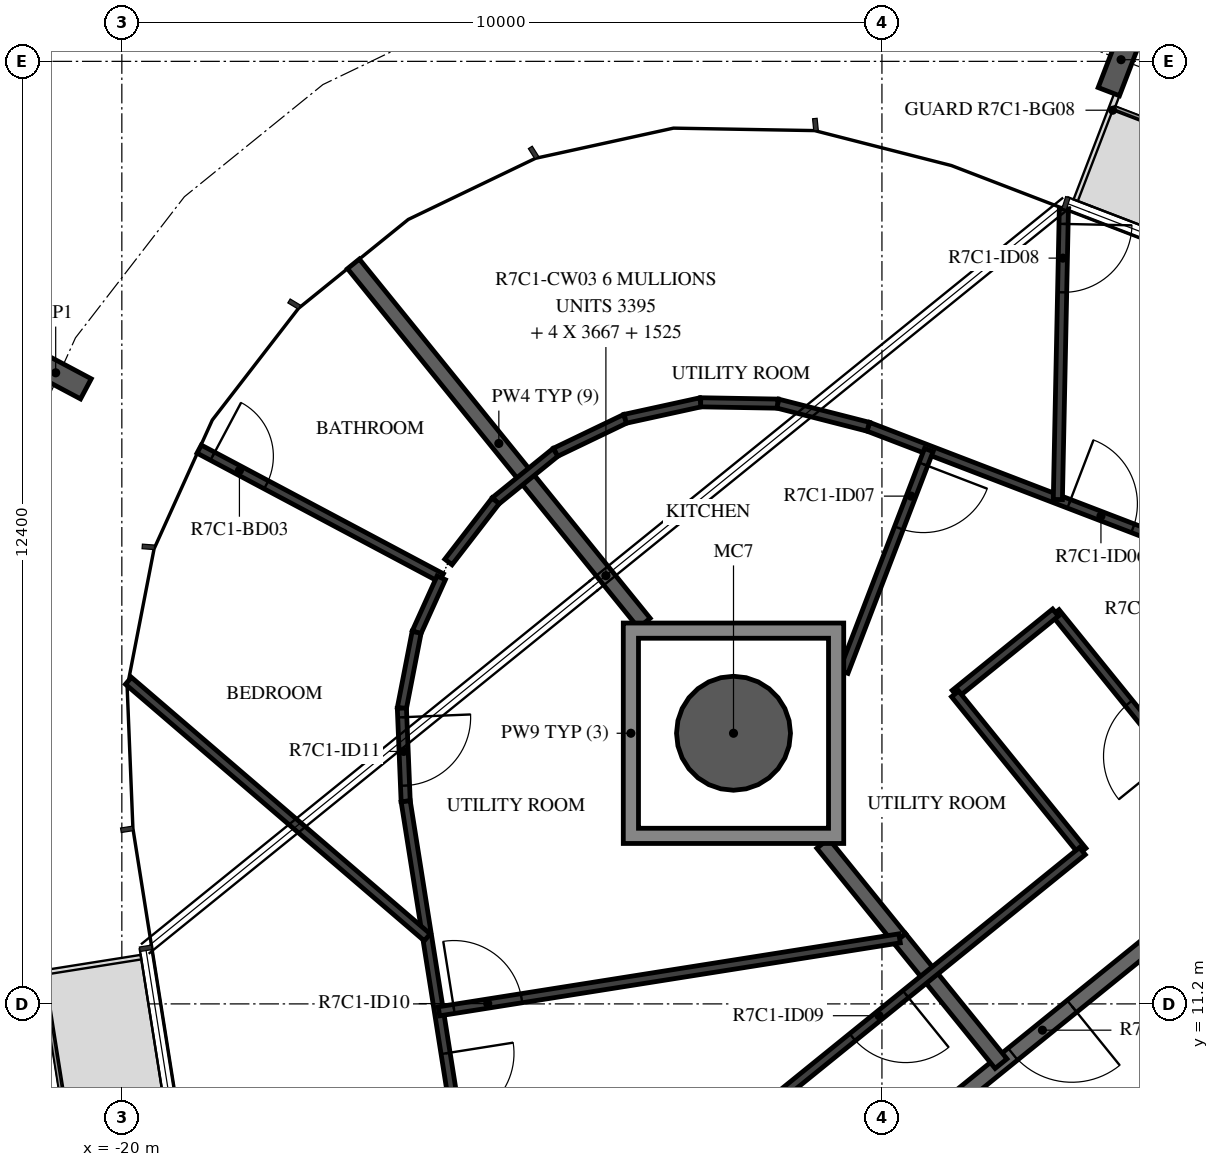
"""IFC4 building model, lengths in metres.
Left out: names, types, materials, properties, quantities, classifications, styles, units other than length and angle.
Written with IfcOpenShell. Run it as: python <this file> out.ifc"""

import sys

from ifc_helpers import new_model, si_unit, direction, frame, frame_2d, origin, origin_2d, place, context, subcontext, project, spatial, polyline, rectangle, hollow_circle, i_section, outline, extrude, element, fill, save


model = new_model("IFC4")
c1 = context("Model", 3, precision=1e-05, world=origin(), true_north=direction((0.0, 1.0)))
c2 = subcontext(c1, "Body", "Model", "MODEL_VIEW")
j1 = project(units=[si_unit("LENGTHUNIT", "METRE"), si_unit("PLANEANGLEUNIT", "RADIAN")], contexts=[c1])
p1 = place(None, origin())
s1 = spatial("IfcSite", under=j1, at=p1, CompositionType="ELEMENT")
p2 = place(p1, origin())
s2 = spatial("IfcBuilding", under=s1, at=p2, CompositionType="ELEMENT")
p3 = place(p2, frame((0.0, 0.0, 287.9)))
s3 = spatial("IfcBuildingStorey", under=s2, at=p3, CompositionType="ELEMENT", Elevation=287.9)
p4 = place(p3, frame((-11.953, 14.76, -0.38), z_axis=(0.0, 0.0, 1.0), x_axis=(1.0, 0.0, 0.0)))
e1 = element("IfcColumn", 1, at=p4, inside=s3, PredefinedType="COLUMN", context=c2, shape_type="SweptSolid", body=[
    extrude(hollow_circle(Radius=0.75, WallThickness=0.035, at=origin_2d()), origin(), (0.0, 0.0, 1.0), 2.616),
])
for number, where, z_axis, x_axis in (
    (2, (-6.854, 23.622, -0.38), (0.0, 0.0, 1.0), (0.934, -0.358, 0.0)),
    (3, (-20.87, 19.503, -0.38), (0.0, 0.0, 1.0), (0.47, 0.883, 0.0)),
):
    element("IfcColumn", number, at=place(p3, frame(where, z_axis=z_axis, x_axis=x_axis)), inside=s3, PredefinedType="COLUMN", context=c2, shape_type="SweptSolid", body=[
        extrude(i_section(OverallWidth=0.3, OverallDepth=0.9, WebThickness=0.019, FlangeThickness=0.035, FilletRadius=0.03, at=origin_2d()), origin(), (0.0, 0.0, 1.0), 2.616),
    ])
p5 = place(p3, frame((-4.51, 10.845, 0.0), z_axis=(0.0, 0.0, 1.0), x_axis=(-0.865975092491, -0.500087131594, 0.0)))
e4 = element("IfcWall", 4, at=p5, inside=s3, PredefinedType="SHEAR", context=c2, shape_type="SweptSolid", body=[
    extrude(rectangle(XDim=3.033, YDim=0.5, at=frame_2d((1.516, 0.0))), origin(), (0.0, 0.0, 1.0), 3.05),
])
p6 = place(p3, frame((-5.643, 12.673, 0.0), z_axis=(0.0, 0.0, 1.0), x_axis=(-0.777160148113, -0.629302871585, 0.0)))
e5 = element("IfcWall", 5, at=p6, inside=s3, PredefinedType="STANDARD", context=c2, shape_type="SweptSolid", body=[
    extrude(rectangle(XDim=7.181, YDim=0.2, at=frame_2d((3.59, 0.0))), origin(), (0.0, 0.0, 1.0), 3.05),
])
p7 = place(p6, frame((2.39, 0.0, 0.0)))
e6 = element("IfcOpeningElement", 6, at=p7, cuts=e5, PredefinedType="OPENING", context=c2, shape_type="SweptSolid", body=[
    extrude(rectangle(XDim=1.0, YDim=2.1, at=frame_2d((0.5, 1.05))), frame((0.0, 0.11, 0.0), z_axis=(0.0, -1.0, 0.0), x_axis=(1.0, 0.0, 0.0)), (0.0, 0.0, 1.0), 0.22),
])
p8 = place(p6, frame((5.19, 0.0, 0.0)))
e7 = element("IfcOpeningElement", 7, at=p8, cuts=e5, PredefinedType="OPENING", context=c2, shape_type="SweptSolid", body=[
    extrude(rectangle(XDim=1.0, YDim=2.1, at=frame_2d((0.5, 1.05))), frame((0.0, 0.11, 0.0), z_axis=(0.0, -1.0, 0.0), x_axis=(1.0, 0.0, 0.0)), (0.0, 0.0, 1.0), 0.22),
])
p9 = place(p3, frame((-9.768, 12.062, 0.0), z_axis=(0.0, 0.0, 1.0), x_axis=(0.629274383598, -0.777183215302, 0.0)))
e8 = element("IfcWall", 8, at=p9, inside=s3, PredefinedType="STANDARD", context=c2, shape_type="SweptSolid", body=[
    extrude(rectangle(XDim=2.121, YDim=0.2, at=frame_2d((1.061, 0.0))), origin(), (0.0, 0.0, 1.0), 3.05),
])
p10 = place(p3, frame((-10.779, 13.311, 0.0), z_axis=(0.0, 0.0, 1.0), x_axis=(0.629373100483, -0.77710327524, 0.0)))
e9 = element("IfcWall", 9, at=p10, inside=s3, PredefinedType="STANDARD", context=c2, shape_type="SweptSolid", body=[
    extrude(rectangle(XDim=1.606, YDim=0.2, at=frame_2d((0.803, 0.0))), origin(), (0.0, 0.0, 1.0), 3.05),
])
p11 = place(p3, frame((-16.953, 20.936, 0.0), z_axis=(0.0, 0.0, 1.0), x_axis=(0.629331057166, -0.777137324085, 0.0)))
e10 = element("IfcWall", 10, at=p11, inside=s3, PredefinedType="STANDARD", context=c2, shape_type="SweptSolid", body=[
    extrude(rectangle(XDim=6.08, YDim=0.2, at=frame_2d((3.04, 0.0))), origin(), (0.0, 0.0, 1.0), 3.05),
])
p12 = place(p3, frame((-5.933, 14.146, 0.0), z_axis=(0.0, 0.0, 1.0), x_axis=(-0.62930727886, 0.777156579316, 0.0)))
e11 = element("IfcWall", 11, at=p12, inside=s3, PredefinedType="PARTITIONING", context=c2, shape_type="SweptSolid", body=[
    extrude(rectangle(XDim=2.833, YDim=0.12, at=frame_2d((1.417, 0.0))), origin(), (0.0, 0.0, 1.0), 3.05),
])
p13 = place(p12, frame((0.4, 0.0, 0.0)))
e12 = element("IfcOpeningElement", 12, at=p13, cuts=e11, PredefinedType="OPENING", context=c2, shape_type="SweptSolid", body=[
    extrude(rectangle(XDim=0.9, YDim=2.1, at=frame_2d((0.45, 1.05))), frame((0.0, 0.07, 0.0), z_axis=(0.0, -1.0, 0.0), x_axis=(1.0, 0.0, 0.0)), (0.0, 0.0, 1.0), 0.14),
])
p14 = place(p3, frame((-7.717, 16.348, 0.0), z_axis=(0.0, 0.0, 1.0), x_axis=(-0.777184671515, -0.629272585103, 0.0)))
e13 = element("IfcWall", 13, at=p14, inside=s3, PredefinedType="PARTITIONING", context=c2, shape_type="SweptSolid", body=[
    extrude(rectangle(XDim=1.7, YDim=0.12, at=frame_2d((0.85, 0.0))), origin(), (0.0, 0.0, 1.0), 3.05),
])
p15 = place(p3, frame((-9.038, 15.278, 0.0), z_axis=(0.0, 0.0, 1.0), x_axis=(0.629338090938, -0.777131628037, 0.0)))
e14 = element("IfcWall", 14, at=p15, inside=s3, PredefinedType="PARTITIONING", context=c2, shape_type="SweptSolid", body=[
    extrude(rectangle(XDim=2.661, YDim=0.12, at=frame_2d((1.331, 0.0))), origin(), (0.0, 0.0, 1.0), 3.05),
])
p16 = place(p3, frame((-7.363, 13.21, 0.0), z_axis=(0.0, 0.0, 1.0), x_axis=(-0.777139504663, -0.629328364443, 0.0)))
e15 = element("IfcWall", 15, at=p16, inside=s3, PredefinedType="PARTITIONING", context=c2, shape_type="SweptSolid", body=[
    extrude(rectangle(XDim=6.584, YDim=0.12, at=frame_2d((3.292, 0.0))), origin(), (0.0, 0.0, 1.0), 3.05),
])
p17 = place(p16, frame((2.991, 0.0, 0.0)))
e16 = element("IfcOpeningElement", 16, at=p17, cuts=e15, PredefinedType="OPENING", context=c2, shape_type="SweptSolid", body=[
    extrude(rectangle(XDim=0.9, YDim=2.1, at=frame_2d((0.45, 1.05))), frame((0.0, 0.07, 0.0), z_axis=(0.0, -1.0, 0.0), x_axis=(1.0, 0.0, 0.0)), (0.0, 0.0, 1.0), 0.14),
])
p18 = place(p3, frame((-10.18, 18.793, 0.0), z_axis=(0.0, 0.0, 1.0), x_axis=(0.933574148929, -0.358384302742, 0.0)))
e17 = element("IfcWall", 17, at=p18, inside=s3, PredefinedType="PARTITIONING", context=c2, shape_type="SweptSolid", body=[
    extrude(rectangle(XDim=10.509, YDim=0.12, at=frame_2d((5.254, 0.0))), origin(), (0.0, 0.0, 1.0), 3.05),
])
p19 = place(p18, frame((2.829, 0.0, 0.0)))
e18 = element("IfcOpeningElement", 18, at=p19, cuts=e17, PredefinedType="OPENING", context=c2, shape_type="SweptSolid", body=[
    extrude(rectangle(XDim=0.9, YDim=2.1, at=frame_2d((0.45, 1.05))), frame((0.0, 0.07, 0.0), z_axis=(0.0, -1.0, 0.0), x_axis=(1.0, 0.0, 0.0)), (0.0, 0.0, 1.0), 0.14),
])
p20 = place(p3, frame((-7.606, 21.661, 0.0), z_axis=(0.0, 0.0, 1.0), x_axis=(-0.020735808663, -0.999784990005, 0.0)))
e19 = element("IfcWall", 19, at=p20, inside=s3, PredefinedType="PARTITIONING", context=c2, shape_type="SweptSolid", body=[
    extrude(rectangle(XDim=3.826, YDim=0.12, at=frame_2d((1.913, 0.0))), origin(), (0.0, 0.0, 1.0), 3.05),
])
p21 = place(p20, frame((0.2, 0.0, 0.0)))
e20 = element("IfcOpeningElement", 20, at=p21, cuts=e19, PredefinedType="OPENING", context=c2, shape_type="SweptSolid", body=[
    extrude(rectangle(XDim=0.9, YDim=2.1, at=frame_2d((0.45, 1.05))), frame((0.0, 0.07, 0.0), z_axis=(0.0, -1.0, 0.0), x_axis=(1.0, 0.0, 0.0)), (0.0, 0.0, 1.0), 0.14),
])
p22 = place(p3, frame((-9.383, 18.487, 0.0), z_axis=(0.0, 0.0, 1.0), x_axis=(-0.358340198137, -0.933591078792, 0.0)))
e21 = element("IfcWall", 21, at=p22, inside=s3, PredefinedType="PARTITIONING", context=c2, shape_type="SweptSolid", body=[
    extrude(rectangle(XDim=3.125, YDim=0.12, at=frame_2d((1.562, 0.0))), origin(), (0.0, 0.0, 1.0), 3.05),
])
p23 = place(p22, frame((0.2, 0.0, 0.0)))
e22 = element("IfcOpeningElement", 22, at=p23, cuts=e21, PredefinedType="OPENING", context=c2, shape_type="SweptSolid", body=[
    extrude(rectangle(XDim=0.9, YDim=2.1, at=frame_2d((0.45, 1.05))), frame((0.0, 0.07, 0.0), z_axis=(0.0, -1.0, 0.0), x_axis=(1.0, 0.0, 0.0)), (0.0, 0.0, 1.0), 0.14),
])
for number, where, z_axis, x_axis in (
    (23, (-15.083, 17.818, 0.0), (0.0, 0.0, 1.0), (0.777, 0.629, 0.0)),
    (24, (-14.293, 18.458, 0.0), (0.0, 0.0, 1.0), (0.901, 0.433, 0.0)),
):
    element("IfcWall", number, at=place(p3, frame(where, z_axis=z_axis, x_axis=x_axis)), inside=s3, PredefinedType="PARTITIONING", context=c2, shape_type="SweptSolid", body=[
        extrude(rectangle(XDim=1.016, YDim=0.12, at=frame_2d((0.508, 0.0))), origin(), (0.0, 0.0, 1.0), 3.05),
    ])
p24 = place(p3, frame((-13.377, 18.898, 0.0), z_axis=(0.0, 0.0, 1.0), x_axis=(0.976972067705, 0.213367239577, 0.0)))
e25 = element("IfcWall", 25, at=p24, inside=s3, PredefinedType="PARTITIONING", context=c2, shape_type="SweptSolid", body=[
    extrude(rectangle(XDim=1.016, YDim=0.12, at=frame_2d((0.508, 0.0))), origin(), (0.0, 0.0, 1.0), 3.05),
])
p25 = place(p3, frame((-12.385, 19.115, 0.0), z_axis=(0.0, 0.0, 1.0), x_axis=(0.999850255535, -0.017305100577, 0.0)))
e26 = element("IfcWall", 26, at=p25, inside=s3, PredefinedType="PARTITIONING", context=c2, shape_type="SweptSolid", body=[
    extrude(rectangle(XDim=1.016, YDim=0.12, at=frame_2d((0.508, 0.0))), origin(), (0.0, 0.0, 1.0), 3.05),
])
p26 = place(p3, frame((-11.369, 19.097, 0.0), z_axis=(0.0, 0.0, 1.0), x_axis=(0.968877104853, -0.247542230117, 0.0)))
e27 = element("IfcWall", 27, at=p26, inside=s3, PredefinedType="PARTITIONING", context=c2, shape_type="SweptSolid", body=[
    extrude(rectangle(XDim=1.227, YDim=0.12, at=frame_2d((0.613, 0.0))), origin(), (0.0, 0.0, 1.0), 3.05),
])
p27 = place(p3, frame((-15.703, 17.014, 0.0), z_axis=(0.0, 0.0, 1.0), x_axis=(0.611091802574, 0.791559731686, 0.0)))
e28 = element("IfcWall", 28, at=p27, inside=s3, PredefinedType="PARTITIONING", context=c2, shape_type="SweptSolid", body=[
    extrude(rectangle(XDim=1.016, YDim=0.12, at=frame_2d((0.508, 0.0))), origin(), (0.0, 0.0, 1.0), 3.05),
])
p28 = place(p3, frame((-18.983, 18.499, 0.0), z_axis=(0.0, 0.0, 1.0), x_axis=(0.882938650306, -0.469488380896, 0.0)))
e29 = element("IfcWall", 29, at=p28, inside=s3, PredefinedType="PARTITIONING", context=c2, shape_type="SweptSolid", body=[
    extrude(rectangle(XDim=3.607, YDim=0.12, at=frame_2d((1.804, 0.0))), origin(), (0.0, 0.0, 1.0), 3.05),
])
p29 = place(p28, frame((0.2, 0.0, 0.0)))
e30 = element("IfcOpeningElement", 30, at=p29, cuts=e29, PredefinedType="OPENING", context=c2, shape_type="SweptSolid", body=[
    extrude(rectangle(XDim=0.8, YDim=2.1, at=frame_2d((0.4, 1.05))), frame((0.0, 0.07, 0.0), z_axis=(0.0, -1.0, 0.0), x_axis=(1.0, 0.0, 0.0)), (0.0, 0.0, 1.0), 0.14),
])
p30 = place(p3, frame((-15.798, 16.805, 0.0), z_axis=(0.0, 0.0, 1.0), x_axis=(-0.411861127809, -0.911246624904, 0.0)))
e31 = element("IfcWall", 31, at=p30, inside=s3, PredefinedType="PARTITIONING", context=c2, shape_type="SweptSolid", body=[
    extrude(rectangle(XDim=0.787, YDim=0.12, at=frame_2d((0.393, 0.0))), origin(), (0.0, 0.0, 1.0), 3.05),
])
p31 = place(p3, frame((-16.122, 16.088, 0.0), z_axis=(0.0, 0.0, 1.0), x_axis=(-0.191030445301, -0.981584112019, 0.0)))
e32 = element("IfcWall", 32, at=p31, inside=s3, PredefinedType="PARTITIONING", context=c2, shape_type="SweptSolid", body=[
    extrude(rectangle(XDim=1.016, YDim=0.12, at=frame_2d((0.508, 0.0))), origin(), (0.0, 0.0, 1.0), 3.05),
])
p32 = place(p3, frame((-16.316, 15.091, 0.0), z_axis=(0.0, 0.0, 1.0), x_axis=(0.040786423131, -0.999167887639, 0.0)))
e33 = element("IfcWall", 33, at=p32, inside=s3, PredefinedType="PARTITIONING", context=c2, shape_type="SweptSolid", body=[
    extrude(rectangle(XDim=1.227, YDim=0.12, at=frame_2d((0.614, 0.0))), origin(), (0.0, 0.0, 1.0), 3.05),
])
p33 = place(p32, frame((0.12, 0.0, 0.0)))
e34 = element("IfcOpeningElement", 34, at=p33, cuts=e33, PredefinedType="OPENING", context=c2, shape_type="SweptSolid", body=[
    extrude(rectangle(XDim=0.9, YDim=2.1, at=frame_2d((0.45, 1.05))), frame((0.0, 0.07, 0.0), z_axis=(0.0, -1.0, 0.0), x_axis=(1.0, 0.0, 0.0)), (0.0, 0.0, 1.0), 0.14),
])
p34 = place(p3, frame((-16.266, 13.865, 0.0), z_axis=(0.0, 0.0, 1.0), x_axis=(0.156422690833, -0.987690205374, 0.0)))
e35 = element("IfcWall", 35, at=p34, inside=s3, PredefinedType="PARTITIONING", context=c2, shape_type="SweptSolid", body=[
    extrude(rectangle(XDim=9.482, YDim=0.12, at=frame_2d((4.741, 0.0))), origin(), (0.0, 0.0, 1.0), 3.05),
])
p35 = place(p34, frame((3.357, 0.0, 0.0)))
e36 = element("IfcOpeningElement", 36, at=p35, cuts=e35, PredefinedType="OPENING", context=c2, shape_type="SweptSolid", body=[
    extrude(rectangle(XDim=0.9, YDim=2.1, at=frame_2d((0.45, 1.05))), frame((0.0, 0.07, 0.0), z_axis=(0.0, -1.0, 0.0), x_axis=(1.0, 0.0, 0.0)), (0.0, 0.0, 1.0), 0.14),
])
p36 = place(p3, frame((-15.828, 11.102, 0.0), z_axis=(0.0, 0.0, 1.0), x_axis=(0.98768671358, 0.156444737262, 0.0)))
e37 = element("IfcWall", 37, at=p36, inside=s3, PredefinedType="PARTITIONING", context=c2, shape_type="SweptSolid", body=[
    extrude(rectangle(XDim=6.136, YDim=0.12, at=frame_2d((3.068, 0.0))), origin(), (0.0, 0.0, 1.0), 3.05),
])
p37 = place(p36, frame((0.2, 0.0, 0.0)))
e38 = element("IfcOpeningElement", 38, at=p37, cuts=e37, PredefinedType="OPENING", context=c2, shape_type="SweptSolid", body=[
    extrude(rectangle(XDim=0.9, YDim=2.1, at=frame_2d((0.45, 1.05))), frame((0.0, 0.07, 0.0), z_axis=(0.0, -1.0, 0.0), x_axis=(1.0, 0.0, 0.0)), (0.0, 0.0, 1.0), 0.14),
])
p38 = place(p3, frame((-19.913, 15.451, 0.0), z_axis=(0.0, 0.0, 1.0), x_axis=(0.758627615547, -0.651524474544, 0.0)))
e39 = element("IfcWall", 39, at=p38, inside=s3, PredefinedType="PARTITIONING", context=c2, shape_type="SweptSolid", body=[
    extrude(rectangle(XDim=5.181, YDim=0.12, at=frame_2d((2.591, 0.0))), origin(), (0.0, 0.0, 1.0), 3.05),
])
p39 = place(p3, origin())
e40 = element("IfcWall", 40, at=p39, inside=s3, PredefinedType="STANDARD", context=c2, shape_type="SweptSolid", body=[
    extrude(outline(polyline([(-10.503, 16.21), (-10.503, 13.311), (-13.403, 13.311), (-13.403, 16.21), (-10.503, 16.21)]), holes=[polyline([(-13.203, 13.51), (-10.703, 13.51), (-10.703, 16.01), (-13.203, 16.01), (-13.203, 13.51)])]), origin(), (0.0, 0.0, 1.0), 3.05),
])
p40 = place(p7, origin())
e41 = element("IfcDoor", 41, at=p40, inside=s3, OperationType="SINGLE_SWING_RIGHT", PredefinedType="DOOR", context=c2, shape_type="SweptSolid", body=[
    extrude(rectangle(XDim=1.0, YDim=2.1, at=frame_2d((0.5, 1.05))), frame((0.0, 0.025, 0.0), z_axis=(0.0, -1.0, 0.0), x_axis=(1.0, 0.0, 0.0)), (0.0, 0.0, 1.0), 0.05),
])
fill(e6, e41)
p41 = place(p13, origin())
e42 = element("IfcDoor", 42, at=p41, inside=s3, OperationType="SINGLE_SWING_RIGHT", PredefinedType="DOOR", context=c2, shape_type="SweptSolid", body=[
    extrude(rectangle(XDim=0.9, YDim=2.1, at=frame_2d((0.45, 1.05))), frame((0.0, 0.025, 0.0), z_axis=(0.0, -1.0, 0.0), x_axis=(1.0, 0.0, 0.0)), (0.0, 0.0, 1.0), 0.05),
])
fill(e12, e42)
p42 = place(p19, origin())
e43 = element("IfcDoor", 43, at=p42, inside=s3, OperationType="SINGLE_SWING_RIGHT", PredefinedType="DOOR", context=c2, shape_type="SweptSolid", body=[
    extrude(rectangle(XDim=0.9, YDim=2.1, at=frame_2d((0.45, 1.05))), frame((0.0, 0.025, 0.0), z_axis=(0.0, -1.0, 0.0), x_axis=(1.0, 0.0, 0.0)), (0.0, 0.0, 1.0), 0.05),
])
fill(e18, e43)
p43 = place(p23, origin())
e44 = element("IfcDoor", 44, at=p43, inside=s3, OperationType="SINGLE_SWING_RIGHT", PredefinedType="DOOR", context=c2, shape_type="SweptSolid", body=[
    extrude(rectangle(XDim=0.9, YDim=2.1, at=frame_2d((0.45, 1.05))), frame((0.0, 0.025, 0.0), z_axis=(0.0, -1.0, 0.0), x_axis=(1.0, 0.0, 0.0)), (0.0, 0.0, 1.0), 0.05),
])
fill(e22, e44)
p44 = place(p21, origin())
e45 = element("IfcDoor", 45, at=p44, inside=s3, OperationType="SINGLE_SWING_RIGHT", PredefinedType="DOOR", context=c2, shape_type="SweptSolid", body=[
    extrude(rectangle(XDim=0.9, YDim=2.1, at=frame_2d((0.45, 1.05))), frame((0.0, 0.025, 0.0), z_axis=(0.0, -1.0, 0.0), x_axis=(1.0, 0.0, 0.0)), (0.0, 0.0, 1.0), 0.05),
])
fill(e20, e45)
p45 = place(p17, origin())
e46 = element("IfcDoor", 46, at=p45, inside=s3, OperationType="SINGLE_SWING_LEFT", PredefinedType="DOOR", context=c2, shape_type="SweptSolid", body=[
    extrude(rectangle(XDim=0.9, YDim=2.1, at=frame_2d((0.45, 1.05))), frame((0.0, 0.025, 0.0), z_axis=(0.0, -1.0, 0.0), x_axis=(1.0, 0.0, 0.0)), (0.0, 0.0, 1.0), 0.05),
])
fill(e16, e46)
p46 = place(p37, origin())
e47 = element("IfcDoor", 47, at=p46, inside=s3, OperationType="SINGLE_SWING_LEFT", PredefinedType="DOOR", context=c2, shape_type="SweptSolid", body=[
    extrude(rectangle(XDim=0.9, YDim=2.1, at=frame_2d((0.45, 1.05))), frame((0.0, 0.025, 0.0), z_axis=(0.0, -1.0, 0.0), x_axis=(1.0, 0.0, 0.0)), (0.0, 0.0, 1.0), 0.05),
])
fill(e38, e47)
p47 = place(p33, origin())
e48 = element("IfcDoor", 48, at=p47, inside=s3, OperationType="SINGLE_SWING_RIGHT", PredefinedType="DOOR", context=c2, shape_type="SweptSolid", body=[
    extrude(rectangle(XDim=0.9, YDim=2.1, at=frame_2d((0.45, 1.05))), frame((0.0, 0.025, 0.0), z_axis=(0.0, -1.0, 0.0), x_axis=(1.0, 0.0, 0.0)), (0.0, 0.0, 1.0), 0.05),
])
fill(e34, e48)
p48 = place(p35, origin())
e49 = element("IfcDoor", 49, at=p48, inside=s3, OperationType="SINGLE_SWING_LEFT", PredefinedType="DOOR", context=c2, shape_type="SweptSolid", body=[
    extrude(rectangle(XDim=0.9, YDim=2.1, at=frame_2d((0.45, 1.05))), frame((0.0, 0.025, 0.0), z_axis=(0.0, -1.0, 0.0), x_axis=(1.0, 0.0, 0.0)), (0.0, 0.0, 1.0), 0.05),
])
fill(e36, e49)
p49 = place(p29, origin())
e50 = element("IfcDoor", 50, at=p49, inside=s3, OperationType="SINGLE_SWING_LEFT", PredefinedType="DOOR", context=c2, shape_type="SweptSolid", body=[
    extrude(rectangle(XDim=0.8, YDim=2.1, at=frame_2d((0.4, 1.05))), frame((0.0, 0.025, 0.0), z_axis=(0.0, -1.0, 0.0), x_axis=(1.0, 0.0, 0.0)), (0.0, 0.0, 1.0), 0.05),
])
fill(e30, e50)
save(model, sys.argv[1])
